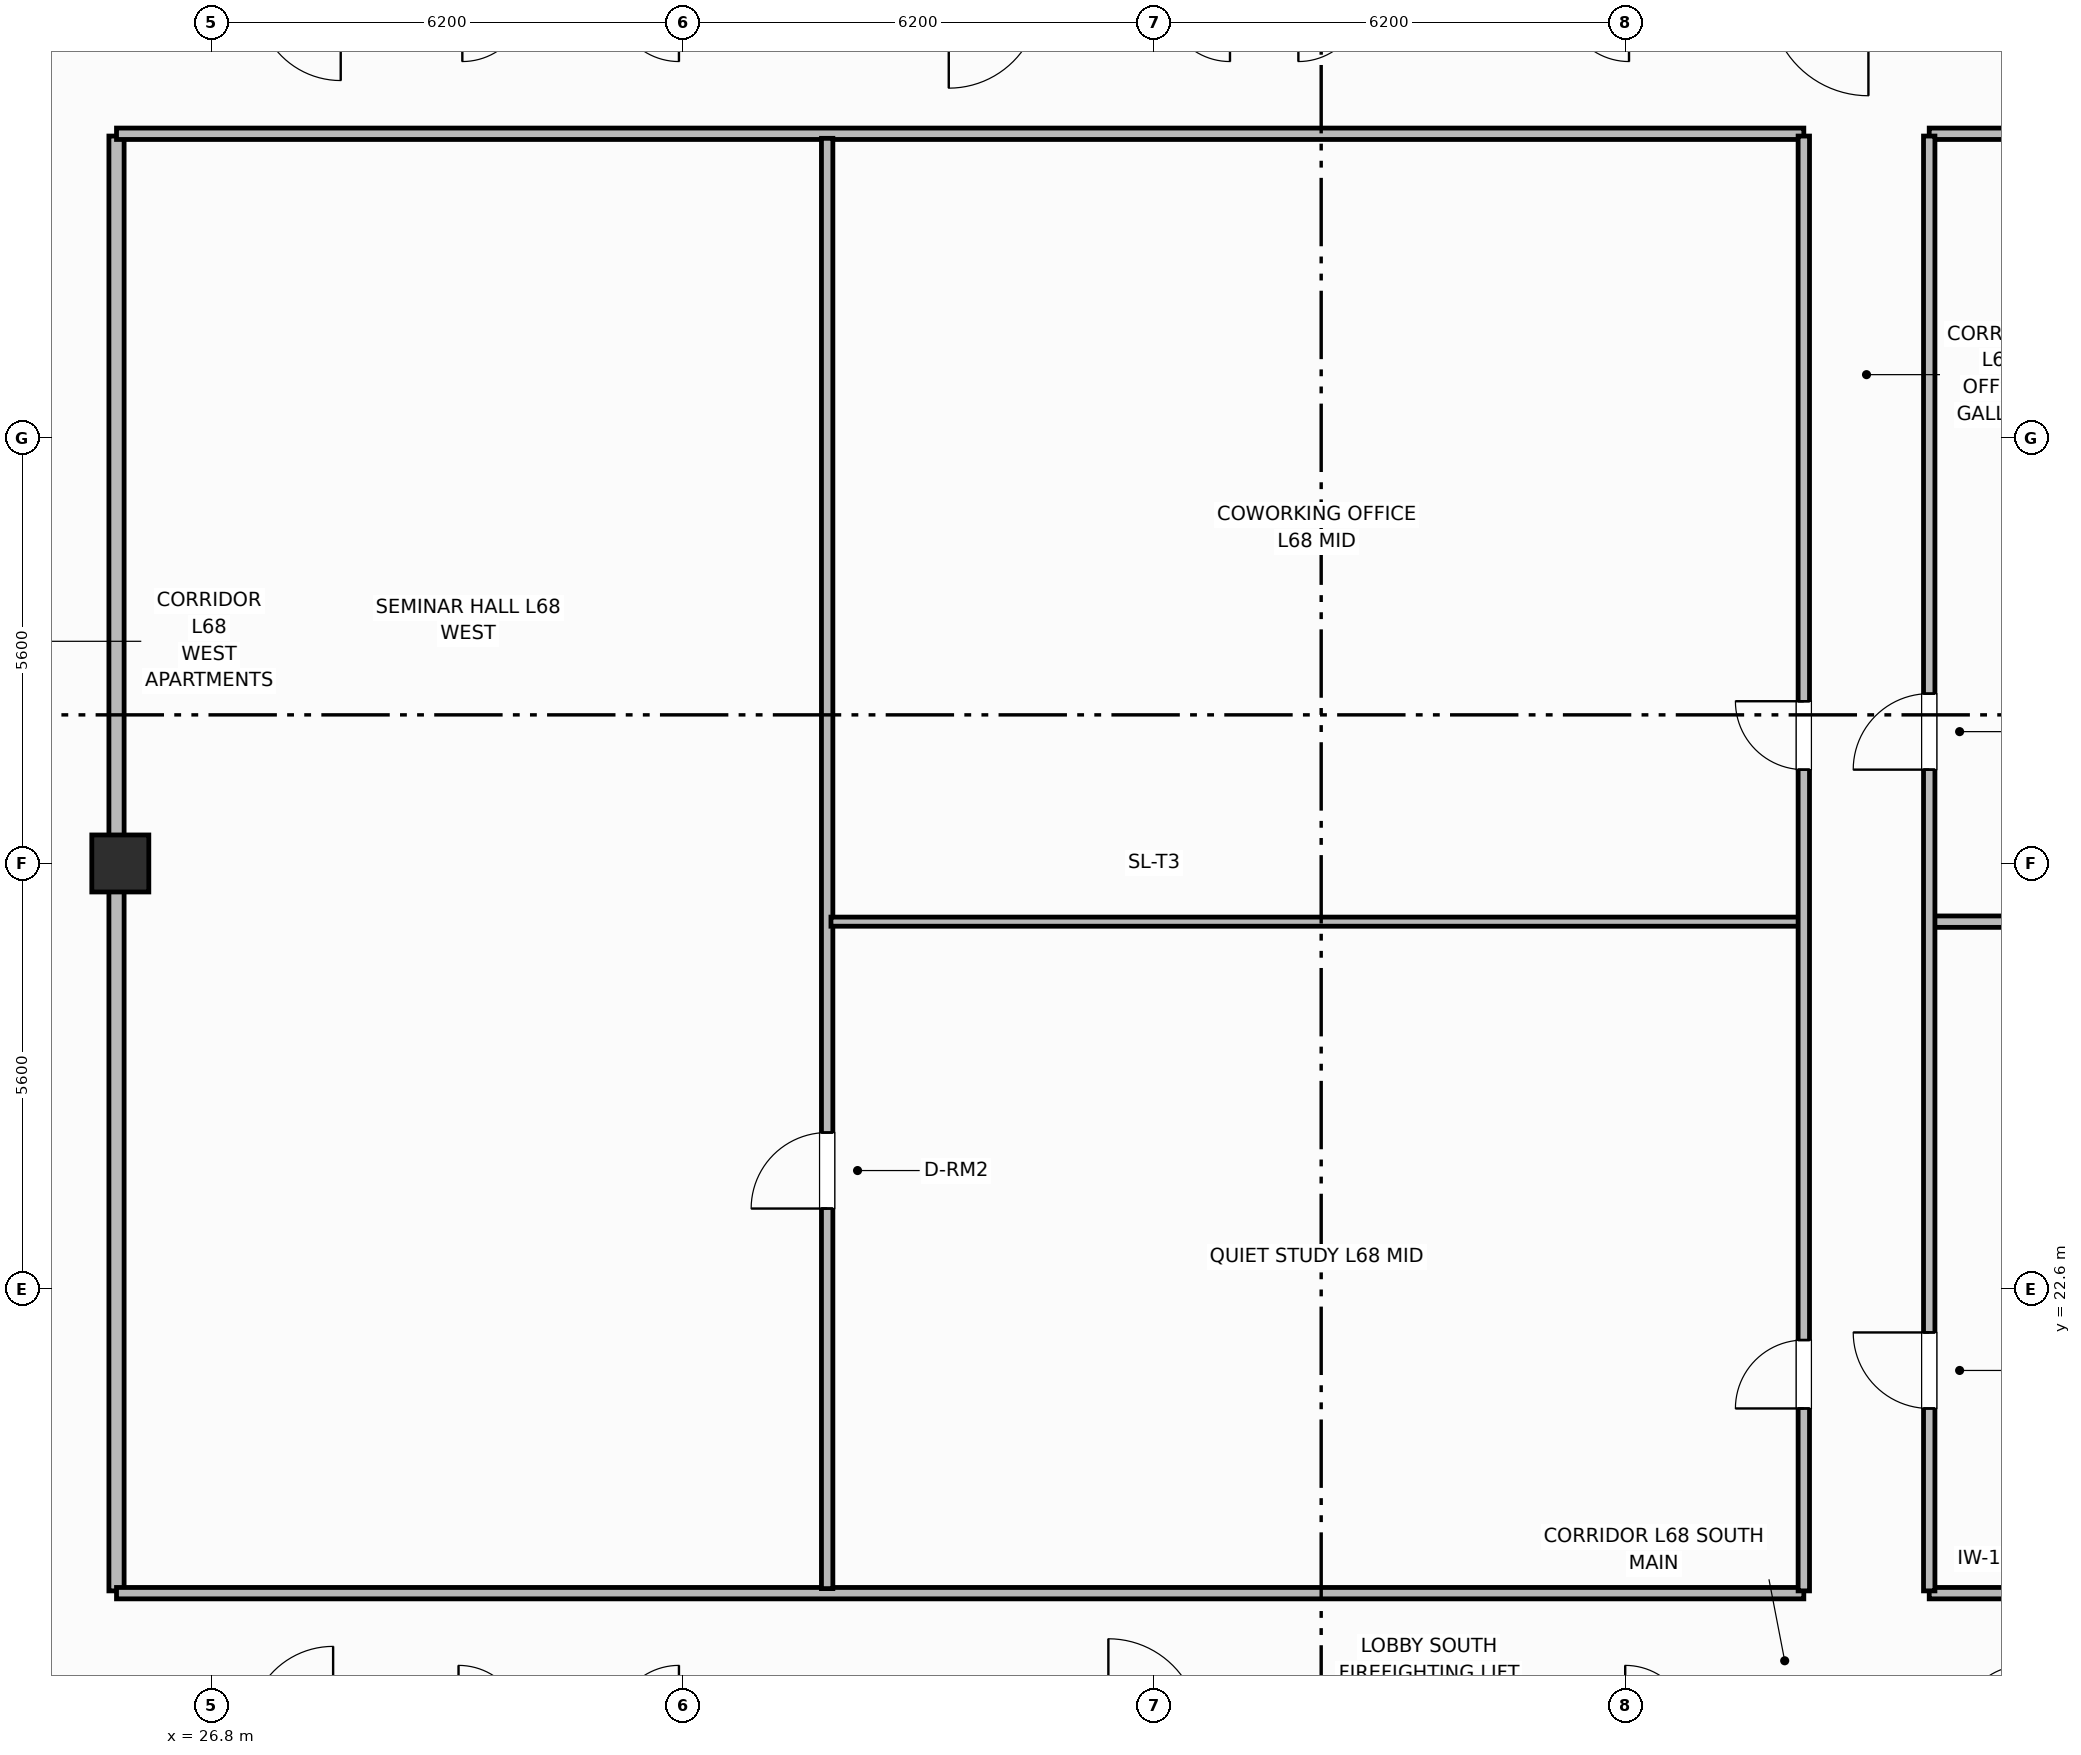
"""IFC4 building model, lengths in metres.
Left out: names, types, materials, properties, quantities, classifications, styles, units other than length and angle.
Written with IfcOpenShell. Run it as: python <this file> out.ifc"""

import sys

from ifc_helpers import new_model, si_unit, direction, frame, frame_2d, origin, origin_2d, place, context, subcontext, project, spatial, rectangle, extrude, element, fill, save


model = new_model("IFC4")
c1 = context("Model", 3, precision=1e-05, world=origin(), true_north=direction((0.0, 1.0)))
c2 = subcontext(c1, "Body", "Model", "MODEL_VIEW")
j1 = project(units=[si_unit("LENGTHUNIT", "METRE"), si_unit("PLANEANGLEUNIT", "RADIAN")], contexts=[c1])
p1 = place(None, origin())
s1 = spatial("IfcSite", under=j1, at=p1, CompositionType="ELEMENT")
p2 = place(p1, origin())
s2 = spatial("IfcBuilding", under=s1, at=p2, CompositionType="ELEMENT")
p3 = place(p2, frame((0.0, 0.0, 271.3)))
s3 = spatial("IfcBuildingStorey", under=s2, at=p3, CompositionType="ELEMENT", Elevation=271.3)
p4 = place(p3, frame((25.6, 28.2, 0.0), z_axis=(0.0, 0.0, 1.0), x_axis=(1.0, 0.0, 0.0)))
e1 = element("IfcColumn", 1, at=p4, inside=s3, PredefinedType="COLUMN", context=c2, shape_type="SweptSolid", body=[
    extrude(rectangle(XDim=0.75, YDim=0.75, at=origin_2d()), origin(), (0.0, 0.0, 1.0), 3.7),
])
p5 = place(p3, frame((25.55, 18.63, 0.0), z_axis=(0.0, 0.0, 1.0), x_axis=(0.0, 1.0, 0.0)))
e2 = element("IfcWall", 2, at=p5, inside=s3, PredefinedType="PARTITIONING", context=c2, shape_type="SweptSolid", body=[
    extrude(rectangle(XDim=19.14, YDim=0.2, at=frame_2d((9.57, 0.0))), origin(), (0.0, 0.0, 1.0), 2.56),
])
p6 = place(p3, frame((25.55, 18.6, 0.0), z_axis=(0.0, 0.0, 1.0), x_axis=(1.0, 0.0, 0.0)))
e3 = element("IfcWall", 3, at=p6, inside=s3, PredefinedType="PARTITIONING", context=c2, shape_type="SweptSolid", body=[
    extrude(rectangle(XDim=22.2, YDim=0.15, at=frame_2d((11.1, 0.0))), origin(), (0.0, 0.0, 1.0), 2.56),
])
p7 = place(p3, frame((49.4, 18.6, 0.0), z_axis=(0.0, 0.0, 1.0), x_axis=(1.0, 0.0, 0.0)))
e4 = element("IfcWall", 4, at=p7, inside=s3, PredefinedType="PARTITIONING", context=c2, shape_type="SweptSolid", body=[
    extrude(rectangle(XDim=3.45, YDim=0.15, at=frame_2d((1.725, 0.0))), origin(), (0.0, 0.0, 1.0), 2.56),
])
p8 = place(p3, frame((25.55, 37.8, 0.0), z_axis=(0.0, 0.0, 1.0), x_axis=(1.0, 0.0, 0.0)))
e5 = element("IfcWall", 5, at=p8, inside=s3, PredefinedType="PARTITIONING", context=c2, shape_type="SweptSolid", body=[
    extrude(rectangle(XDim=22.2, YDim=0.15, at=frame_2d((11.1, 0.0))), origin(), (0.0, 0.0, 1.0), 2.56),
])
p9 = place(p3, frame((49.4, 37.8, 0.0), z_axis=(0.0, 0.0, 1.0), x_axis=(1.0, 0.0, 0.0)))
e6 = element("IfcWall", 6, at=p9, inside=s3, PredefinedType="PARTITIONING", context=c2, shape_type="SweptSolid", body=[
    extrude(rectangle(XDim=3.45, YDim=0.15, at=frame_2d((1.725, 0.0))), origin(), (0.0, 0.0, 1.0), 2.56),
])
p10 = place(p3, frame((34.9, 18.66, 0.0), z_axis=(0.0, 0.0, 1.0), x_axis=(0.0, 1.0, 0.0)))
e7 = element("IfcWall", 7, at=p10, inside=s3, PredefinedType="PARTITIONING", context=c2, shape_type="SweptSolid", body=[
    extrude(rectangle(XDim=19.08, YDim=0.15, at=frame_2d((9.54, 0.0))), origin(), (0.0, 0.0, 1.0), 2.56),
])
p11 = place(p10, frame((5.0, 0.0, 0.0)))
e8 = element("IfcOpeningElement", 8, at=p11, cuts=e7, PredefinedType="OPENING", context=c2, shape_type="SweptSolid", body=[
    extrude(rectangle(XDim=1.0, YDim=2.15, at=frame_2d((0.5, 1.075))), frame((0.0, 0.085, 0.0), z_axis=(0.0, -1.0, 0.0), x_axis=(1.0, 0.0, 0.0)), (0.0, 0.0, 1.0), 0.17),
])
p12 = place(p3, frame((34.95, 27.434, 0.0), z_axis=(0.0, 0.0, 1.0), x_axis=(1.0, 0.0, 0.0)))
e9 = element("IfcWall", 9, at=p12, inside=s3, PredefinedType="PARTITIONING", context=c2, shape_type="SweptSolid", body=[
    extrude(rectangle(XDim=12.81, YDim=0.12, at=frame_2d((6.405, 0.0))), origin(), (0.0, 0.0, 1.0), 2.56),
])
p13 = place(p3, frame((49.43, 27.434, 0.0), z_axis=(0.0, 0.0, 1.0), x_axis=(1.0, 0.0, 0.0)))
e10 = element("IfcWall", 10, at=p13, inside=s3, PredefinedType="PARTITIONING", context=c2, shape_type="SweptSolid", body=[
    extrude(rectangle(XDim=3.37, YDim=0.15, at=frame_2d((1.685, 0.0))), origin(), (0.0, 0.0, 1.0), 2.56),
])
p14 = place(p3, frame((47.75, 18.63, 0.0), z_axis=(0.0, 0.0, 1.0), x_axis=(0.0, 1.0, 0.0)))
e11 = element("IfcWall", 11, at=p14, inside=s3, PredefinedType="PARTITIONING", context=c2, shape_type="SweptSolid", body=[
    extrude(rectangle(XDim=19.14, YDim=0.15, at=frame_2d((9.57, 0.0))), origin(), (0.0, 0.0, 1.0), 2.56),
])
p15 = place(p14, frame((2.4, 0.0, 0.0)))
e12 = element("IfcOpeningElement", 12, at=p15, cuts=e11, PredefinedType="OPENING", context=c2, shape_type="SweptSolid", body=[
    extrude(rectangle(XDim=0.9, YDim=2.1, at=frame_2d((0.45, 1.05))), frame((0.0, 0.085, 0.0), z_axis=(0.0, -1.0, 0.0), x_axis=(1.0, 0.0, 0.0)), (0.0, 0.0, 1.0), 0.17),
])
p16 = place(p14, frame((10.804, 0.0, 0.0)))
e13 = element("IfcOpeningElement", 13, at=p16, cuts=e11, PredefinedType="OPENING", context=c2, shape_type="SweptSolid", body=[
    extrude(rectangle(XDim=0.9, YDim=2.1, at=frame_2d((0.45, 1.05))), frame((0.0, 0.085, 0.0), z_axis=(0.0, -1.0, 0.0), x_axis=(1.0, 0.0, 0.0)), (0.0, 0.0, 1.0), 0.17),
])
p17 = place(p3, frame((49.4, 18.63, 0.0), z_axis=(0.0, 0.0, 1.0), x_axis=(0.0, 1.0, 0.0)))
e14 = element("IfcWall", 14, at=p17, inside=s3, PredefinedType="PARTITIONING", context=c2, shape_type="SweptSolid", body=[
    extrude(rectangle(XDim=19.14, YDim=0.15, at=frame_2d((9.57, 0.0))), origin(), (0.0, 0.0, 1.0), 2.56),
])
p18 = place(p17, frame((2.4, 0.0, 0.0)))
e15 = element("IfcOpeningElement", 15, at=p18, cuts=e14, PredefinedType="OPENING", context=c2, shape_type="SweptSolid", body=[
    extrude(rectangle(XDim=1.0, YDim=2.15, at=frame_2d((0.5, 1.075))), frame((0.0, 0.085, 0.0), z_axis=(0.0, -1.0, 0.0), x_axis=(1.0, 0.0, 0.0)), (0.0, 0.0, 1.0), 0.17),
])
p19 = place(p17, frame((10.804, 0.0, 0.0)))
e16 = element("IfcOpeningElement", 16, at=p19, cuts=e14, PredefinedType="OPENING", context=c2, shape_type="SweptSolid", body=[
    extrude(rectangle(XDim=1.0, YDim=2.15, at=frame_2d((0.5, 1.075))), frame((0.0, 0.085, 0.0), z_axis=(0.0, -1.0, 0.0), x_axis=(1.0, 0.0, 0.0)), (0.0, 0.0, 1.0), 0.17),
])
p20 = place(p11, origin())
e17 = element("IfcDoor", 17, at=p20, inside=s3, OperationType="SINGLE_SWING_LEFT", PredefinedType="DOOR", context=c2, shape_type="SweptSolid", body=[
    extrude(rectangle(XDim=1.0, YDim=2.15, at=frame_2d((0.5, 1.075))), frame((0.0, 0.025, 0.0), z_axis=(0.0, -1.0, 0.0), x_axis=(1.0, 0.0, 0.0)), (0.0, 0.0, 1.0), 0.05),
])
fill(e8, e17)
p21 = place(p15, origin())
e18 = element("IfcDoor", 18, at=p21, inside=s3, OperationType="SINGLE_SWING_LEFT", PredefinedType="DOOR", context=c2, shape_type="SweptSolid", body=[
    extrude(rectangle(XDim=0.9, YDim=2.1, at=frame_2d((0.45, 1.05))), frame((0.0, 0.025, 0.0), z_axis=(0.0, -1.0, 0.0), x_axis=(1.0, 0.0, 0.0)), (0.0, 0.0, 1.0), 0.05),
])
fill(e12, e18)
p22 = place(p16, origin())
e19 = element("IfcDoor", 19, at=p22, inside=s3, OperationType="SINGLE_SWING_RIGHT", PredefinedType="DOOR", context=c2, shape_type="SweptSolid", body=[
    extrude(rectangle(XDim=0.9, YDim=2.1, at=frame_2d((0.45, 1.05))), frame((0.0, 0.025, 0.0), z_axis=(0.0, -1.0, 0.0), x_axis=(1.0, 0.0, 0.0)), (0.0, 0.0, 1.0), 0.05),
])
fill(e13, e19)
p23 = place(p18, origin())
e20 = element("IfcDoor", 20, at=p23, inside=s3, OperationType="SINGLE_SWING_RIGHT", PredefinedType="DOOR", context=c2, shape_type="SweptSolid", body=[
    extrude(rectangle(XDim=1.0, YDim=2.15, at=frame_2d((0.5, 1.075))), frame((0.0, 0.025, 0.0), z_axis=(0.0, -1.0, 0.0), x_axis=(1.0, 0.0, 0.0)), (0.0, 0.0, 1.0), 0.05),
])
fill(e15, e20)
p24 = place(p19, origin())
e21 = element("IfcDoor", 21, at=p24, inside=s3, OperationType="SINGLE_SWING_LEFT", PredefinedType="DOOR", context=c2, shape_type="SweptSolid", body=[
    extrude(rectangle(XDim=1.0, YDim=2.15, at=frame_2d((0.5, 1.075))), frame((0.0, 0.025, 0.0), z_axis=(0.0, -1.0, 0.0), x_axis=(1.0, 0.0, 0.0)), (0.0, 0.0, 1.0), 0.05),
])
fill(e16, e21)
save(model, sys.argv[1])
